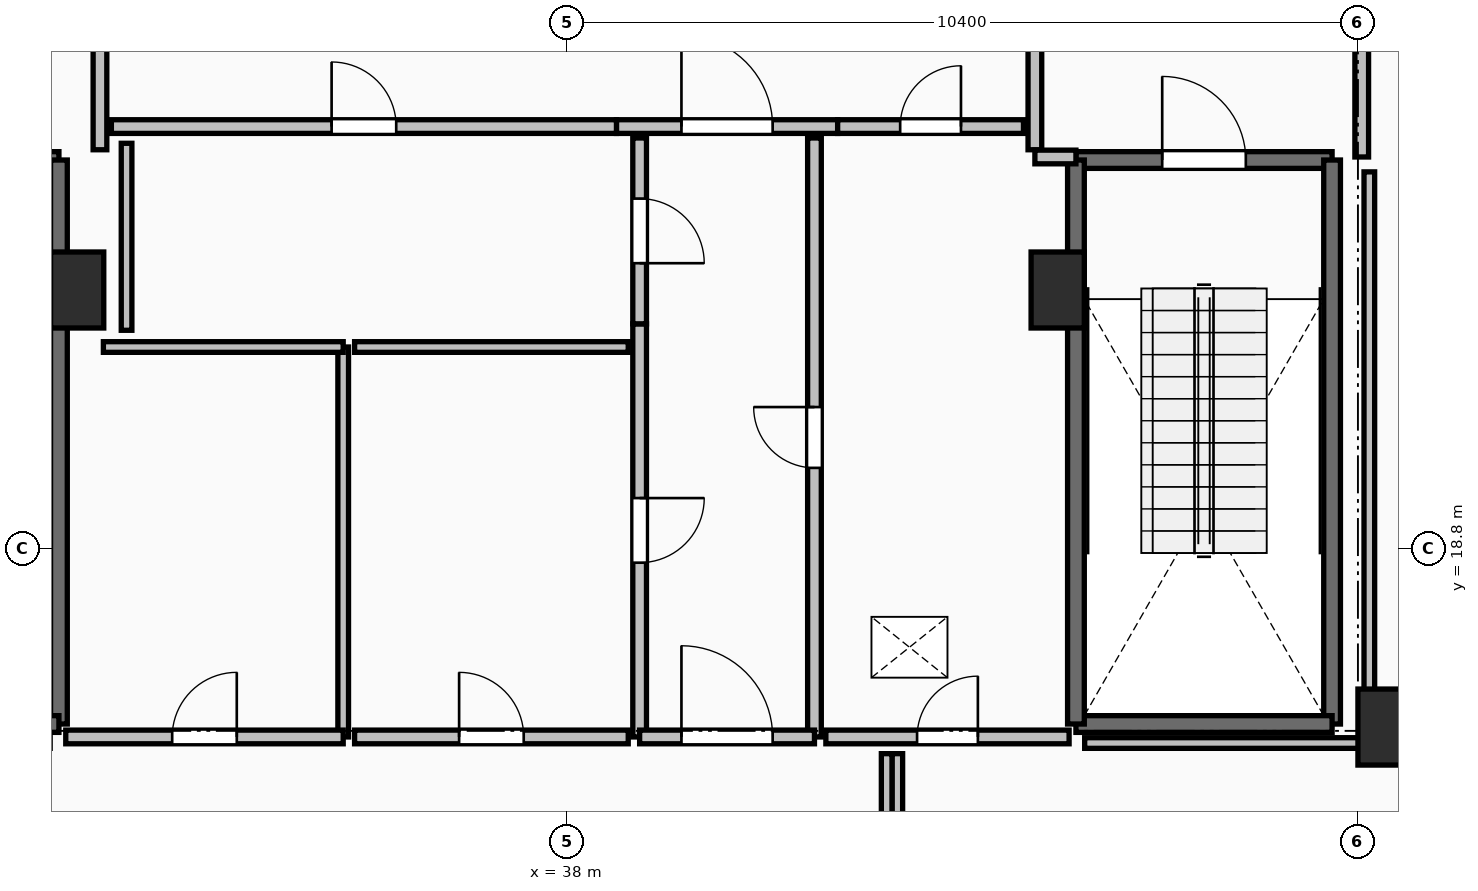
"""IFC4 building model, lengths in metres.
Left out: names, types, materials, properties, quantities, classifications, styles, units other than length and angle.
Written with IfcOpenShell. Run it as: python <this file> out.ifc"""

import sys

from ifc_helpers import new_model, si_unit, direction, frame, frame_2d, origin, origin_2d, place, context, subcontext, project, spatial, rectangle, extrude, element, fill, save


model = new_model("IFC4")
c1 = context("Model", 3, precision=1e-05, world=origin(), true_north=direction((0.0, 1.0)))
c2 = subcontext(c1, "Body", "Model", "MODEL_VIEW")
j1 = project(units=[si_unit("LENGTHUNIT", "METRE"), si_unit("PLANEANGLEUNIT", "RADIAN")], contexts=[c1])
p1 = place(None, origin())
s1 = spatial("IfcSite", under=j1, at=p1, CompositionType="ELEMENT")
p2 = place(p1, origin())
s2 = spatial("IfcBuilding", under=s1, at=p2, CompositionType="ELEMENT")
p3 = place(p2, frame((0.0, 0.0, 229.75)))
s3 = spatial("IfcBuildingStorey", under=s2, at=p3, CompositionType="ELEMENT", Elevation=229.75)
for number, where, z_axis, x_axis in (
    (1, (31.55, 22.2, 0.0), (0.0, 0.0, 1.0), (1.0, 0.0, 0.0)),
    (2, (48.75, 16.45, 0.0), (0.0, 0.0, 1.0), (1.0, 0.0, 0.0)),
    (3, (44.45, 22.2, 0.0), (0.0, 0.0, 1.0), (1.0, 0.0, 0.0)),
):
    element("IfcColumn", number, at=place(p3, frame(where, z_axis=z_axis, x_axis=x_axis)), inside=s3, PredefinedType="PILASTER", context=c2, shape_type="SweptSolid", body=[
        extrude(rectangle(XDim=0.7, YDim=1.0, at=origin_2d()), origin(), (0.0, 0.0, 1.0), 4.5),
    ])
p4 = place(p3, frame((27.94, 23.91, 0.0), z_axis=(0.0, 0.0, 1.0), x_axis=(1.0, 0.0, 0.0)))
e4 = element("IfcWall", 4, at=p4, inside=s3, PredefinedType="SOLIDWALL", context=c2, shape_type="SweptSolid", body=[
    extrude(rectangle(XDim=3.37, YDim=0.22, at=frame_2d((1.685, 0.0))), origin(), (0.0, 0.0, 1.0), 4.24),
])
p5 = place(p4, frame((1.135, 0.0, 0.0)))
e5 = element("IfcOpeningElement", 5, at=p5, cuts=e4, PredefinedType="OPENING", context=c2, shape_type="SweptSolid", body=[
    extrude(rectangle(XDim=1.1, YDim=2.15, at=frame_2d((0.55, 1.075))), frame((0.0, 0.125, 0.0), z_axis=(0.0, -1.0, 0.0), x_axis=(1.0, 0.0, 0.0)), (0.0, 0.0, 1.0), 0.25),
])
p6 = place(p3, frame((31.31, 23.91, 0.0), z_axis=(0.0, 0.0, 1.0), x_axis=(0.0, -1.0, 0.0)))
e6 = element("IfcWall", 6, at=p6, inside=s3, PredefinedType="SOLIDWALL", context=c2, shape_type="SweptSolid", body=[
    extrude(rectangle(XDim=7.42, YDim=0.22, at=frame_2d((3.71, 0.0))), origin(), (0.0, 0.0, 1.0), 4.24),
])
p7 = place(p3, frame((31.31, 16.49, 0.0), z_axis=(0.0, 0.0, 1.0), x_axis=(-1.0, 0.0, 0.0)))
e7 = element("IfcWall", 7, at=p7, inside=s3, PredefinedType="SOLIDWALL", context=c2, shape_type="SweptSolid", body=[
    extrude(rectangle(XDim=3.37, YDim=0.22, at=frame_2d((1.685, 0.0))), origin(), (0.0, 0.0, 1.0), 4.24),
])
p8 = place(p3, frame((44.69, 23.91, 0.0), z_axis=(0.0, 0.0, 1.0), x_axis=(1.0, 0.0, 0.0)))
e8 = element("IfcWall", 8, at=p8, inside=s3, PredefinedType="SOLIDWALL", context=c2, shape_type="SweptSolid", body=[
    extrude(rectangle(XDim=3.37, YDim=0.22, at=frame_2d((1.685, 0.0))), origin(), (0.0, 0.0, 1.0), 4.24),
])
p9 = place(p8, frame((1.135, 0.0, 0.0)))
e9 = element("IfcOpeningElement", 9, at=p9, cuts=e8, PredefinedType="OPENING", context=c2, shape_type="SweptSolid", body=[
    extrude(rectangle(XDim=1.1, YDim=2.15, at=frame_2d((0.55, 1.075))), frame((0.0, 0.125, 0.0), z_axis=(0.0, -1.0, 0.0), x_axis=(1.0, 0.0, 0.0)), (0.0, 0.0, 1.0), 0.25),
])
p10 = place(p3, frame((48.06, 23.91, 0.0), z_axis=(0.0, 0.0, 1.0), x_axis=(0.0, -1.0, 0.0)))
e10 = element("IfcWall", 10, at=p10, inside=s3, PredefinedType="SOLIDWALL", context=c2, shape_type="SweptSolid", body=[
    extrude(rectangle(XDim=7.42, YDim=0.22, at=frame_2d((3.71, 0.0))), origin(), (0.0, 0.0, 1.0), 4.24),
])
p11 = place(p3, frame((48.06, 16.49, 0.0), z_axis=(0.0, 0.0, 1.0), x_axis=(-1.0, 0.0, 0.0)))
e11 = element("IfcWall", 11, at=p11, inside=s3, PredefinedType="SOLIDWALL", context=c2, shape_type="SweptSolid", body=[
    extrude(rectangle(XDim=3.37, YDim=0.22, at=frame_2d((1.685, 0.0))), origin(), (0.0, 0.0, 1.0), 4.24),
])
p12 = place(p3, frame((44.69, 16.49, 0.0), z_axis=(0.0, 0.0, 1.0), x_axis=(0.0, 1.0, 0.0)))
e12 = element("IfcWall", 12, at=p12, inside=s3, PredefinedType="SOLIDWALL", context=c2, shape_type="SweptSolid", body=[
    extrude(rectangle(XDim=7.42, YDim=0.22, at=frame_2d((3.71, 0.0))), origin(), (0.0, 0.0, 1.0), 4.24),
])
p13 = place(p3, frame((31.85, 24.045, 0.0), z_axis=(0.0, 0.0, 1.0), x_axis=(0.0, 1.0, 0.0)))
e13 = element("IfcWall", 13, at=p13, inside=s3, PredefinedType="PARTITIONING", context=c2, shape_type="SweptSolid", body=[
    extrude(rectangle(XDim=3.91, YDim=0.18, at=frame_2d((1.955, 0.0))), origin(), (0.0, 0.0, 1.0), 4.24),
])
p14 = place(p13, frame((1.355, 0.0, 0.0)))
e14 = element("IfcOpeningElement", 14, at=p14, cuts=e13, PredefinedType="OPENING", context=c2, shape_type="SweptSolid", body=[
    extrude(rectangle(XDim=1.2, YDim=2.15, at=frame_2d((0.6, 1.075))), frame((0.0, 0.105, 0.0), z_axis=(0.0, -1.0, 0.0), x_axis=(1.0, 0.0, 0.0)), (0.0, 0.0, 1.0), 0.21),
])
p15 = place(p3, frame((44.15, 27.955, 0.0), z_axis=(0.0, 0.0, 1.0), x_axis=(0.0, -1.0, 0.0)))
e15 = element("IfcWall", 15, at=p15, inside=s3, PredefinedType="PARTITIONING", context=c2, shape_type="SweptSolid", body=[
    extrude(rectangle(XDim=3.91, YDim=0.18, at=frame_2d((1.955, 0.0))), origin(), (0.0, 0.0, 1.0), 4.24),
])
p16 = place(p15, frame((1.355, 0.0, 0.0)))
e16 = element("IfcOpeningElement", 16, at=p16, cuts=e15, PredefinedType="OPENING", context=c2, shape_type="SweptSolid", body=[
    extrude(rectangle(XDim=1.2, YDim=2.15, at=frame_2d((0.6, 1.075))), frame((0.0, 0.105, 0.0), z_axis=(0.0, -1.0, 0.0), x_axis=(1.0, 0.0, 0.0)), (0.0, 0.0, 1.0), 0.21),
])
p17 = place(p3, frame((44.15, 23.95, 0.0), z_axis=(0.0, 0.0, 1.0), x_axis=(1.0, 0.0, 0.0)))
e17 = element("IfcWall", 17, at=p17, inside=s3, PredefinedType="PARTITIONING", context=c2, shape_type="SweptSolid", body=[
    extrude(rectangle(XDim=0.54, YDim=0.18, at=frame_2d((0.27, 0.0))), origin(), (0.0, 0.0, 1.0), 4.24),
])
p18 = place(p3, frame((48.45, 23.95, 0.0), z_axis=(0.0, 0.0, 1.0), x_axis=(0.0, 1.0, 0.0)))
e18 = element("IfcWall", 18, at=p18, inside=s3, PredefinedType="PARTITIONING", context=c2, shape_type="SweptSolid", body=[
    extrude(rectangle(XDim=4.05, YDim=0.18, at=frame_2d((2.025, 0.0))), origin(), (0.0, 0.0, 1.0), 4.24),
])
p19 = place(p18, frame((1.425, 0.0, 0.0)))
e19 = element("IfcOpeningElement", 19, at=p19, cuts=e18, PredefinedType="OPENING", context=c2, shape_type="SweptSolid", body=[
    extrude(rectangle(XDim=1.2, YDim=2.15, at=frame_2d((0.6, 1.075))), frame((0.0, 0.105, 0.0), z_axis=(0.0, -1.0, 0.0), x_axis=(1.0, 0.0, 0.0)), (0.0, 0.0, 1.0), 0.21),
])
p20 = place(p3, frame((38.645, 24.35, 0.0), z_axis=(0.0, 0.0, 1.0), x_axis=(1.0, 0.0, 0.0)))
e20 = element("IfcWall", 20, at=p20, inside=s3, PredefinedType="PARTITIONING", context=c2, shape_type="SweptSolid", body=[
    extrude(rectangle(XDim=2.91, YDim=0.18, at=frame_2d((1.455, 0.0))), origin(), (0.0, 0.0, 1.0), 4.24),
])
p21 = place(p20, frame((0.855, 0.0, 0.0)))
e21 = element("IfcOpeningElement", 21, at=p21, cuts=e20, PredefinedType="OPENING", context=c2, shape_type="SweptSolid", body=[
    extrude(rectangle(XDim=1.2, YDim=2.15, at=frame_2d((0.6, 1.075))), frame((0.0, 0.105, 0.0), z_axis=(0.0, -1.0, 0.0), x_axis=(1.0, 0.0, 0.0)), (0.0, 0.0, 1.0), 0.21),
])
p22 = place(p3, frame((41.555, 24.35, 0.0), z_axis=(0.0, 0.0, 1.0), x_axis=(1.0, 0.0, 0.0)))
e22 = element("IfcWall", 22, at=p22, inside=s3, PredefinedType="PARTITIONING", context=c2, shape_type="SweptSolid", body=[
    extrude(rectangle(XDim=2.445, YDim=0.18, at=frame_2d((1.223, 0.0))), origin(), (0.0, 0.0, 1.0), 4.24),
])
p23 = place(p22, frame((0.823, 0.0, 0.0)))
e23 = element("IfcOpeningElement", 23, at=p23, cuts=e22, PredefinedType="OPENING", context=c2, shape_type="SweptSolid", body=[
    extrude(rectangle(XDim=0.8, YDim=2.05, at=frame_2d((0.4, 1.025))), frame((0.0, 0.105, 0.0), z_axis=(0.0, -1.0, 0.0), x_axis=(1.0, 0.0, 0.0)), (0.0, 0.0, 1.0), 0.21),
])
p24 = place(p3, frame((32.0, 24.35, 0.0), z_axis=(0.0, 0.0, 1.0), x_axis=(1.0, 0.0, 0.0)))
e24 = element("IfcWall", 24, at=p24, inside=s3, PredefinedType="PARTITIONING", context=c2, shape_type="SweptSolid", body=[
    extrude(rectangle(XDim=6.645, YDim=0.18, at=frame_2d((3.323, 0.0))), origin(), (0.0, 0.0, 1.0), 4.24),
])
p25 = place(p24, frame((2.897, 0.0, 0.0)))
e25 = element("IfcOpeningElement", 25, at=p25, cuts=e24, PredefinedType="OPENING", context=c2, shape_type="SweptSolid", body=[
    extrude(rectangle(XDim=0.85, YDim=2.1, at=frame_2d((0.425, 1.05))), frame((0.0, 0.105, 0.0), z_axis=(0.0, -1.0, 0.0), x_axis=(1.0, 0.0, 0.0)), (0.0, 0.0, 1.0), 0.21),
])
p26 = place(p3, frame((41.25, 16.32, 0.0), z_axis=(0.0, 0.0, 1.0), x_axis=(0.0, 1.0, 0.0)))
e26 = element("IfcWall", 26, at=p26, inside=s3, PredefinedType="PARTITIONING", context=c2, shape_type="SweptSolid", body=[
    extrude(rectangle(XDim=7.88, YDim=0.18, at=frame_2d((3.94, 0.0))), origin(), (0.0, 0.0, 1.0), 3.432),
])
p27 = place(p26, frame((3.54, 0.0, 0.0)))
e27 = element("IfcOpeningElement", 27, at=p27, cuts=e26, PredefinedType="OPENING", context=c2, shape_type="SweptSolid", body=[
    extrude(rectangle(XDim=0.8, YDim=2.05, at=frame_2d((0.4, 1.025))), frame((0.0, 0.105, 0.0), z_axis=(0.0, -1.0, 0.0), x_axis=(1.0, 0.0, 0.0)), (0.0, 0.0, 1.0), 0.21),
])
p28 = place(p3, frame((38.95, 21.755, 0.0), z_axis=(0.0, 0.0, 1.0), x_axis=(0.0, -1.0, 0.0)))
e28 = element("IfcWall", 28, at=p28, inside=s3, PredefinedType="PARTITIONING", context=c2, shape_type="SweptSolid", body=[
    extrude(rectangle(XDim=5.435, YDim=0.18, at=frame_2d((2.717, 0.0))), origin(), (0.0, 0.0, 1.0), 4.24),
])
p29 = place(p28, frame((2.292, 0.0, 0.0)))
e29 = element("IfcOpeningElement", 29, at=p29, cuts=e28, PredefinedType="OPENING", context=c2, shape_type="SweptSolid", body=[
    extrude(rectangle(XDim=0.85, YDim=2.1, at=frame_2d((0.425, 1.05))), frame((0.0, 0.105, 0.0), z_axis=(0.0, -1.0, 0.0), x_axis=(1.0, 0.0, 0.0)), (0.0, 0.0, 1.0), 0.21),
])
p30 = place(p3, frame((38.95, 24.2, 0.0), z_axis=(0.0, 0.0, 1.0), x_axis=(0.0, -1.0, 0.0)))
e30 = element("IfcWall", 30, at=p30, inside=s3, PredefinedType="PARTITIONING", context=c2, shape_type="SweptSolid", body=[
    extrude(rectangle(XDim=2.445, YDim=0.18, at=frame_2d((1.223, 0.0))), origin(), (0.0, 0.0, 1.0), 3.432),
])
p31 = place(p30, frame((0.798, 0.0, 0.0)))
e31 = element("IfcOpeningElement", 31, at=p31, cuts=e30, PredefinedType="OPENING", context=c2, shape_type="SweptSolid", body=[
    extrude(rectangle(XDim=0.85, YDim=2.1, at=frame_2d((0.425, 1.05))), frame((0.0, 0.105, 0.0), z_axis=(0.0, -1.0, 0.0), x_axis=(1.0, 0.0, 0.0)), (0.0, 0.0, 1.0), 0.21),
])
p32 = place(p3, frame((38.95, 16.32, 0.0), z_axis=(0.0, 0.0, 1.0), x_axis=(1.0, 0.0, 0.0)))
e32 = element("IfcWall", 32, at=p32, inside=s3, PredefinedType="PARTITIONING", context=c2, shape_type="SweptSolid", body=[
    extrude(rectangle(XDim=2.3, YDim=0.18, at=frame_2d((1.15, 0.0))), origin(), (0.0, 0.0, 1.0), 4.24),
])
p33 = place(p32, frame((0.55, 0.0, 0.0)))
e33 = element("IfcOpeningElement", 33, at=p33, cuts=e32, PredefinedType="OPENING", context=c2, shape_type="SweptSolid", body=[
    extrude(rectangle(XDim=1.2, YDim=2.15, at=frame_2d((0.6, 1.075))), frame((0.0, 0.105, 0.0), z_axis=(0.0, -1.0, 0.0), x_axis=(1.0, 0.0, 0.0)), (0.0, 0.0, 1.0), 0.21),
])
p34 = place(p3, frame((41.4, 16.32, 0.0), z_axis=(0.0, 0.0, 1.0), x_axis=(1.0, 0.0, 0.0)))
e34 = element("IfcWall", 34, at=p34, inside=s3, PredefinedType="PARTITIONING", context=c2, shape_type="SweptSolid", body=[
    extrude(rectangle(XDim=3.2, YDim=0.18, at=frame_2d((1.6, 0.0))), origin(), (0.0, 0.0, 1.0), 4.24),
])
p35 = place(p34, frame((1.2, 0.0, 0.0)))
e35 = element("IfcOpeningElement", 35, at=p35, cuts=e34, PredefinedType="OPENING", context=c2, shape_type="SweptSolid", body=[
    extrude(rectangle(XDim=0.8, YDim=2.05, at=frame_2d((0.4, 1.025))), frame((0.0, 0.105, 0.0), z_axis=(0.0, -1.0, 0.0), x_axis=(1.0, 0.0, 0.0)), (0.0, 0.0, 1.0), 0.21),
])
p36 = place(p3, frame((35.05, 16.32, 0.0), z_axis=(0.0, 0.0, 1.0), x_axis=(0.0, 1.0, 0.0)))
e36 = element("IfcWall", 36, at=p36, inside=s3, PredefinedType="PARTITIONING", context=c2, shape_type="SweptSolid", body=[
    extrude(rectangle(XDim=5.13, YDim=0.14, at=frame_2d((2.565, 0.0))), origin(), (0.0, 0.0, 1.0), 4.24),
])
p37 = place(p3, frame((35.05, 21.45, 0.0), z_axis=(0.0, 0.0, 1.0), x_axis=(-1.0, 0.0, 0.0)))
e37 = element("IfcWall", 37, at=p37, inside=s3, PredefinedType="PARTITIONING", context=c2, shape_type="SweptSolid", body=[
    extrude(rectangle(XDim=3.155, YDim=0.14, at=frame_2d((1.578, 0.0))), origin(), (0.0, 0.0, 1.0), 4.24),
])
p38 = place(p3, frame((31.4, 16.32, 0.0), z_axis=(0.0, 0.0, 1.0), x_axis=(1.0, 0.0, 0.0)))
e38 = element("IfcWall", 38, at=p38, inside=s3, PredefinedType="PARTITIONING", context=c2, shape_type="SweptSolid", body=[
    extrude(rectangle(XDim=3.65, YDim=0.18, at=frame_2d((1.825, 0.0))), origin(), (0.0, 0.0, 1.0), 4.24),
])
p39 = place(p38, frame((1.4, 0.0, 0.0)))
e39 = element("IfcOpeningElement", 39, at=p39, cuts=e38, PredefinedType="OPENING", context=c2, shape_type="SweptSolid", body=[
    extrude(rectangle(XDim=0.85, YDim=2.1, at=frame_2d((0.425, 1.05))), frame((0.0, 0.105, 0.0), z_axis=(0.0, -1.0, 0.0), x_axis=(1.0, 0.0, 0.0)), (0.0, 0.0, 1.0), 0.21),
])
p40 = place(p3, frame((38.8, 21.45, 0.0), z_axis=(0.0, 0.0, 1.0), x_axis=(-1.0, 0.0, 0.0)))
e40 = element("IfcWall", 40, at=p40, inside=s3, PredefinedType="PARTITIONING", context=c2, shape_type="SweptSolid", body=[
    extrude(rectangle(XDim=3.6, YDim=0.14, at=frame_2d((1.8, 0.0))), origin(), (0.0, 0.0, 1.0), 4.24),
])
p41 = place(p3, frame((35.2, 16.32, 0.0), z_axis=(0.0, 0.0, 1.0), x_axis=(1.0, 0.0, 0.0)))
e41 = element("IfcWall", 41, at=p41, inside=s3, PredefinedType="PARTITIONING", context=c2, shape_type="SweptSolid", body=[
    extrude(rectangle(XDim=3.6, YDim=0.18, at=frame_2d((1.8, 0.0))), origin(), (0.0, 0.0, 1.0), 4.24),
])
p42 = place(p41, frame((1.375, 0.0, 0.0)))
e42 = element("IfcOpeningElement", 42, at=p42, cuts=e41, PredefinedType="OPENING", context=c2, shape_type="SweptSolid", body=[
    extrude(rectangle(XDim=0.85, YDim=2.1, at=frame_2d((0.425, 1.05))), frame((0.0, 0.105, 0.0), z_axis=(0.0, -1.0, 0.0), x_axis=(1.0, 0.0, 0.0)), (0.0, 0.0, 1.0), 0.21),
])
p43 = place(p3, frame((32.2, 24.13, 0.0), z_axis=(0.0, 0.0, 1.0), x_axis=(0.0, -1.0, 0.0)))
e43 = element("IfcWall", 43, at=p43, inside=s3, PredefinedType="PARTITIONING", context=c2, shape_type="SweptSolid", body=[
    extrude(rectangle(XDim=2.46, YDim=0.14, at=frame_2d((1.23, 0.0))), origin(), (0.0, 0.0, 1.0), 3.432),
])
p44 = place(p3, frame((42.34, 14.27, 0.0), z_axis=(0.0, 0.0, 1.0), x_axis=(0.0, 1.0, 0.0)))
e44 = element("IfcWall", 44, at=p44, inside=s3, PredefinedType="PARTITIONING", context=c2, shape_type="SweptSolid", body=[
    extrude(rectangle(XDim=1.83, YDim=0.14, at=frame_2d((0.915, 0.0))), origin(), (0.0, 0.0, 1.0), 3.929),
])
p45 = place(p3, frame((44.805, 16.24, 0.0), z_axis=(0.0, 0.0, 1.0), x_axis=(1.0, 0.0, 0.0)))
e45 = element("IfcWall", 45, at=p45, inside=s3, PredefinedType="PARTITIONING", context=c2, shape_type="SweptSolid", body=[
    extrude(rectangle(XDim=3.745, YDim=0.14, at=frame_2d((1.873, 0.0))), origin(), (0.0, 0.0, 1.0), 3.432),
])
p46 = place(p3, frame((48.55, 16.24, 0.0), z_axis=(0.0, 0.0, 1.0), x_axis=(0.0, 1.0, 0.0)))
e46 = element("IfcWall", 46, at=p46, inside=s3, PredefinedType="PARTITIONING", context=c2, shape_type="SweptSolid", body=[
    extrude(rectangle(XDim=7.514, YDim=0.14, at=frame_2d((3.757, 0.0))), origin(), (0.0, 0.0, 1.0), 3.432),
])
p47 = place(p3, frame((42.2, 16.1, 0.0), z_axis=(0.0, 0.0, 1.0), x_axis=(0.0, -1.0, 0.0)))
e47 = element("IfcWall", 47, at=p47, inside=s3, PredefinedType="PARTITIONING", context=c2, shape_type="SweptSolid", body=[
    extrude(rectangle(XDim=1.83, YDim=0.14, at=frame_2d((0.915, 0.0))), origin(), (0.0, 0.0, 1.0), 3.929),
])
p48 = place(p9, origin())
e48 = element("IfcDoor", 48, at=p48, inside=s3, OperationType="SINGLE_SWING_LEFT", PredefinedType="DOOR", context=c2, shape_type="SweptSolid", body=[
    extrude(rectangle(XDim=1.1, YDim=2.15, at=frame_2d((0.55, 1.075))), frame((0.0, 0.025, 0.0), z_axis=(0.0, -1.0, 0.0), x_axis=(1.0, 0.0, 0.0)), (0.0, 0.0, 1.0), 0.05),
])
fill(e9, e48)
p49 = place(p21, origin())
e49 = element("IfcDoor", 49, at=p49, inside=s3, OperationType="SINGLE_SWING_LEFT", PredefinedType="DOOR", context=c2, shape_type="SweptSolid", body=[
    extrude(rectangle(XDim=1.2, YDim=2.15, at=frame_2d((0.6, 1.075))), frame((0.0, 0.025, 0.0), z_axis=(0.0, -1.0, 0.0), x_axis=(1.0, 0.0, 0.0)), (0.0, 0.0, 1.0), 0.05),
])
fill(e21, e49)
p50 = place(p23, origin())
e50 = element("IfcDoor", 50, at=p50, inside=s3, OperationType="SINGLE_SWING_RIGHT", PredefinedType="DOOR", context=c2, shape_type="SweptSolid", body=[
    extrude(rectangle(XDim=0.8, YDim=2.05, at=frame_2d((0.4, 1.025))), frame((0.0, 0.025, 0.0), z_axis=(0.0, -1.0, 0.0), x_axis=(1.0, 0.0, 0.0)), (0.0, 0.0, 1.0), 0.05),
])
fill(e23, e50)
p51 = place(p25, origin())
e51 = element("IfcDoor", 51, at=p51, inside=s3, OperationType="SINGLE_SWING_LEFT", PredefinedType="DOOR", context=c2, shape_type="SweptSolid", body=[
    extrude(rectangle(XDim=0.85, YDim=2.1, at=frame_2d((0.425, 1.05))), frame((0.0, 0.025, 0.0), z_axis=(0.0, -1.0, 0.0), x_axis=(1.0, 0.0, 0.0)), (0.0, 0.0, 1.0), 0.05),
])
fill(e25, e51)
p52 = place(p27, origin())
e52 = element("IfcDoor", 52, at=p52, inside=s3, OperationType="SINGLE_SWING_RIGHT", PredefinedType="DOOR", context=c2, shape_type="SweptSolid", body=[
    extrude(rectangle(XDim=0.8, YDim=2.05, at=frame_2d((0.4, 1.025))), frame((0.0, 0.025, 0.0), z_axis=(0.0, -1.0, 0.0), x_axis=(1.0, 0.0, 0.0)), (0.0, 0.0, 1.0), 0.05),
])
fill(e27, e52)
p53 = place(p29, origin())
e53 = element("IfcDoor", 53, at=p53, inside=s3, OperationType="SINGLE_SWING_LEFT", PredefinedType="DOOR", context=c2, shape_type="SweptSolid", body=[
    extrude(rectangle(XDim=0.85, YDim=2.1, at=frame_2d((0.425, 1.05))), frame((0.0, 0.025, 0.0), z_axis=(0.0, -1.0, 0.0), x_axis=(1.0, 0.0, 0.0)), (0.0, 0.0, 1.0), 0.05),
])
fill(e29, e53)
p54 = place(p31, origin())
e54 = element("IfcDoor", 54, at=p54, inside=s3, OperationType="SINGLE_SWING_RIGHT", PredefinedType="DOOR", context=c2, shape_type="SweptSolid", body=[
    extrude(rectangle(XDim=0.85, YDim=2.1, at=frame_2d((0.425, 1.05))), frame((0.0, 0.025, 0.0), z_axis=(0.0, -1.0, 0.0), x_axis=(1.0, 0.0, 0.0)), (0.0, 0.0, 1.0), 0.05),
])
fill(e31, e54)
p55 = place(p33, origin())
e55 = element("IfcDoor", 55, at=p55, inside=s3, OperationType="SINGLE_SWING_LEFT", PredefinedType="DOOR", context=c2, shape_type="SweptSolid", body=[
    extrude(rectangle(XDim=1.2, YDim=2.15, at=frame_2d((0.6, 1.075))), frame((0.0, 0.025, 0.0), z_axis=(0.0, -1.0, 0.0), x_axis=(1.0, 0.0, 0.0)), (0.0, 0.0, 1.0), 0.05),
])
fill(e33, e55)
p56 = place(p35, origin())
e56 = element("IfcDoor", 56, at=p56, inside=s3, OperationType="SINGLE_SWING_RIGHT", PredefinedType="DOOR", context=c2, shape_type="SweptSolid", body=[
    extrude(rectangle(XDim=0.8, YDim=2.05, at=frame_2d((0.4, 1.025))), frame((0.0, 0.025, 0.0), z_axis=(0.0, -1.0, 0.0), x_axis=(1.0, 0.0, 0.0)), (0.0, 0.0, 1.0), 0.05),
])
fill(e35, e56)
p57 = place(p39, origin())
e57 = element("IfcDoor", 57, at=p57, inside=s3, OperationType="SINGLE_SWING_RIGHT", PredefinedType="DOOR", context=c2, shape_type="SweptSolid", body=[
    extrude(rectangle(XDim=0.85, YDim=2.1, at=frame_2d((0.425, 1.05))), frame((0.0, 0.025, 0.0), z_axis=(0.0, -1.0, 0.0), x_axis=(1.0, 0.0, 0.0)), (0.0, 0.0, 1.0), 0.05),
])
fill(e39, e57)
p58 = place(p42, origin())
e58 = element("IfcDoor", 58, at=p58, inside=s3, OperationType="SINGLE_SWING_LEFT", PredefinedType="DOOR", context=c2, shape_type="SweptSolid", body=[
    extrude(rectangle(XDim=0.85, YDim=2.1, at=frame_2d((0.425, 1.05))), frame((0.0, 0.025, 0.0), z_axis=(0.0, -1.0, 0.0), x_axis=(1.0, 0.0, 0.0)), (0.0, 0.0, 1.0), 0.05),
])
fill(e42, e58)
save(model, sys.argv[1])
